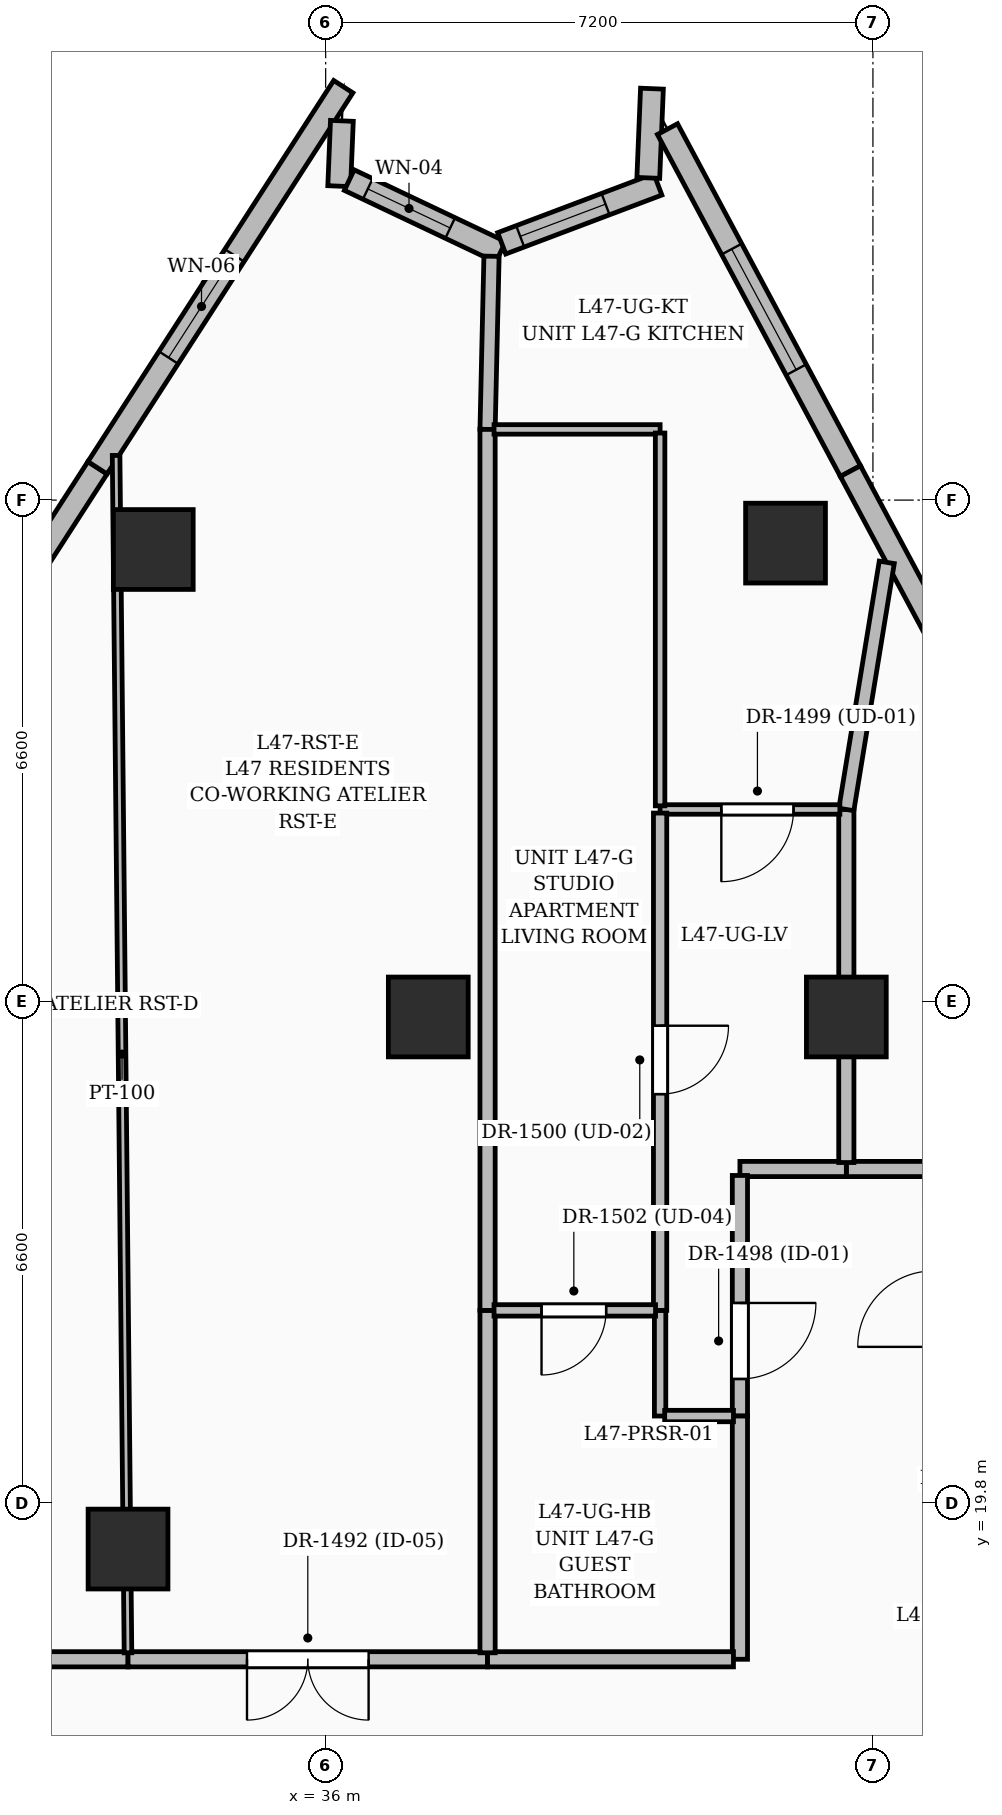
"""IFC4 building model, lengths in metres.
Left out: names, types, materials, properties, quantities, classifications, styles, units other than length and angle.
Written with IfcOpenShell. Run it as: python <this file> out.ifc"""

import sys

from ifc_helpers import new_model, si_unit, direction, frame, frame_2d, origin, origin_2d, place, context, subcontext, project, spatial, rectangle, extrude, element, fill, save


model = new_model("IFC4")
c1 = context("Model", 3, precision=1e-05, world=origin(), true_north=direction((0.0, 1.0)))
c2 = subcontext(c1, "Body", "Model", "MODEL_VIEW")
j1 = project(units=[si_unit("LENGTHUNIT", "METRE"), si_unit("PLANEANGLEUNIT", "RADIAN")], contexts=[c1])
p1 = place(None, origin())
s1 = spatial("IfcSite", under=j1, at=p1, CompositionType="ELEMENT")
p2 = place(p1, origin())
s2 = spatial("IfcBuilding", under=s1, at=p2, CompositionType="ELEMENT")
p3 = place(p2, frame((0.0, 0.0, 182.4)))
s3 = spatial("IfcBuildingStorey", under=s2, at=p3, CompositionType="ELEMENT", Elevation=182.4)
for number, where, z_axis, x_axis in (
    (1, (42.85, 26.2, 0.0), (0.0, 0.0, 1.0), (1.0, 0.0, 0.0)),
    (2, (37.35, 26.2, 0.0), (0.0, 0.0, 1.0), (1.0, 0.0, 0.0)),
    (3, (33.4, 19.2, 0.0), (0.0, 0.0, 1.0), (1.0, 0.0, 0.0)),
    (4, (42.05, 32.434, 0.0), (0.0, 0.0, 1.0), (1.0, 0.0, 0.0)),
    (5, (33.732, 32.35, 0.0), (0.0, 0.0, 1.0), (1.0, 0.0, 0.0)),
):
    element("IfcColumn", number, at=place(p3, frame(where, z_axis=z_axis, x_axis=x_axis)), inside=s3, PredefinedType="COLUMN", context=c2, shape_type="SweptSolid", body=[
        extrude(rectangle(XDim=1.05, YDim=1.05, at=origin_2d()), origin(), (0.0, 0.0, 1.0), 3.6),
    ])
p4 = place(p3, frame((29.764, 28.411, 0.0), z_axis=(0.0, 0.0, 1.0), x_axis=(0.542030871579, 0.840358574809, 0.0)))
e6 = element("IfcWall", 6, at=p4, inside=s3, PredefinedType="SOLIDWALL", context=c2, shape_type="SweptSolid", body=[
    extrude(rectangle(XDim=5.967, YDim=0.3, at=frame_2d((2.983, 0.0))), origin(), (0.0, 0.0, 1.0), 3.35),
])
p5 = place(p4, frame((2.0, 0.0, 0.6)))
e7 = element("IfcOpeningElement", 7, at=p5, cuts=e6, PredefinedType="OPENING", context=c2, shape_type="SweptSolid", body=[
    extrude(rectangle(XDim=1.8, YDim=2.1, at=frame_2d((0.9, 1.05))), frame((0.0, 0.16, 0.0), z_axis=(0.0, -1.0, 0.0), x_axis=(1.0, 0.0, 0.0)), (0.0, 0.0, 1.0), 0.32),
])
p6 = place(p3, frame((32.998, 33.425, 0.0), z_axis=(0.0, 0.0, 1.0), x_axis=(0.542020612911, 0.840365191556, 0.0)))
e8 = element("IfcWall", 8, at=p6, inside=s3, PredefinedType="SOLIDWALL", context=c2, shape_type="SweptSolid", body=[
    extrude(rectangle(XDim=5.966, YDim=0.3, at=frame_2d((2.983, 0.0))), origin(), (0.0, 0.0, 1.0), 3.35),
])
p7 = place(p6, frame((1.725, 0.0, 0.55)))
e9 = element("IfcOpeningElement", 9, at=p7, cuts=e8, PredefinedType="OPENING", context=c2, shape_type="SweptSolid", body=[
    extrude(rectangle(XDim=1.6, YDim=2.2, at=frame_2d((0.8, 1.1))), frame((0.0, 0.16, 0.0), z_axis=(0.0, -1.0, 0.0), x_axis=(1.0, 0.0, 0.0)), (0.0, 0.0, 1.0), 0.32),
])
p8 = place(p3, frame((36.213, 37.99, 0.0), z_axis=(0.0, 0.0, 1.0), x_axis=(-0.040874902035, -0.999164271971, 0.0)))
e10 = element("IfcWall", 10, at=p8, inside=s3, PredefinedType="SOLIDWALL", context=c2, shape_type="SweptSolid", body=[
    extrude(rectangle(XDim=0.86, YDim=0.3, at=frame_2d((0.43, 0.0))), origin(), (0.0, 0.0, 1.0), 3.35),
])
p9 = place(p3, frame((36.311, 37.21, 0.0), z_axis=(0.0, 0.0, 1.0), x_axis=(0.903471604204, -0.428647944585, 0.0)))
e11 = element("IfcWall", 11, at=p9, inside=s3, PredefinedType="SOLIDWALL", context=c2, shape_type="SweptSolid", body=[
    extrude(rectangle(XDim=2.205, YDim=0.3, at=frame_2d((1.103, 0.0))), origin(), (0.0, 0.0, 1.0), 3.35),
])
p10 = place(p9, frame((0.27, 0.0, 0.8)))
e12 = element("IfcOpeningElement", 12, at=p10, cuts=e11, PredefinedType="OPENING", context=c2, shape_type="SweptSolid", body=[
    extrude(rectangle(XDim=1.2, YDim=1.8, at=frame_2d((0.6, 0.9))), frame((0.0, 0.16, 0.0), z_axis=(0.0, -1.0, 0.0), x_axis=(1.0, 0.0, 0.0)), (0.0, 0.0, 1.0), 0.32),
])
p11 = place(p3, frame((38.316, 36.378, 0.0), z_axis=(0.0, 0.0, 1.0), x_axis=(0.935503953589, 0.353316222129, 0.0)))
e13 = element("IfcWall", 13, at=p11, inside=s3, PredefinedType="SOLIDWALL", context=c2, shape_type="SweptSolid", body=[
    extrude(rectangle(XDim=2.195, YDim=0.3, at=frame_2d((1.098, 0.0))), origin(), (0.0, 0.0, 1.0), 3.35),
])
p12 = place(p11, frame((0.26, 0.0, 0.8)))
e14 = element("IfcOpeningElement", 14, at=p12, cuts=e13, PredefinedType="OPENING", context=c2, shape_type="SweptSolid", body=[
    extrude(rectangle(XDim=1.2, YDim=1.8, at=frame_2d((0.6, 0.9))), frame((0.0, 0.16, 0.0), z_axis=(0.0, -1.0, 0.0), x_axis=(1.0, 0.0, 0.0)), (0.0, 0.0, 1.0), 0.32),
])
p13 = place(p3, frame((40.245, 37.239, 0.0), z_axis=(0.0, 0.0, 1.0), x_axis=(0.040939027533, 0.999161646594, 0.0)))
e15 = element("IfcWall", 15, at=p13, inside=s3, PredefinedType="SOLIDWALL", context=c2, shape_type="SweptSolid", body=[
    extrude(rectangle(XDim=1.175, YDim=0.3, at=frame_2d((0.587, 0.0))), origin(), (0.0, 0.0, 1.0), 3.35),
])
p14 = place(p3, frame((40.497, 37.881, 0.0), z_axis=(0.0, 0.0, 1.0), x_axis=(0.47173271257, -0.881741599274, 0.0)))
e16 = element("IfcWall", 16, at=p14, inside=s3, PredefinedType="SOLIDWALL", context=c2, shape_type="SweptSolid", body=[
    extrude(rectangle(XDim=5.103, YDim=0.3, at=frame_2d((2.551, 0.0))), origin(), (0.0, 0.0, 1.0), 3.35),
])
p15 = place(p14, frame((1.79, 0.0, 0.6)))
e17 = element("IfcOpeningElement", 17, at=p15, cuts=e16, PredefinedType="OPENING", context=c2, shape_type="SweptSolid", body=[
    extrude(rectangle(XDim=1.8, YDim=2.1, at=frame_2d((0.9, 1.05))), frame((0.0, 0.16, 0.0), z_axis=(0.0, -1.0, 0.0), x_axis=(1.0, 0.0, 0.0)), (0.0, 0.0, 1.0), 0.32),
])
p16 = place(p3, frame((42.904, 33.382, 0.0), z_axis=(0.0, 0.0, 1.0), x_axis=(0.4716995968, -0.881759315448, 0.0)))
e18 = element("IfcWall", 18, at=p16, inside=s3, PredefinedType="SOLIDWALL", context=c2, shape_type="SweptSolid", body=[
    extrude(rectangle(XDim=5.688, YDim=0.3, at=frame_2d((2.844, 0.0))), origin(), (0.0, 0.0, 1.0), 3.35),
])
p17 = place(p16, frame((2.35, 0.0, 0.55)))
e19 = element("IfcOpeningElement", 19, at=p17, cuts=e18, PredefinedType="OPENING", context=c2, shape_type="SweptSolid", body=[
    extrude(rectangle(XDim=1.6, YDim=2.2, at=frame_2d((0.8, 1.1))), frame((0.0, 0.16, 0.0), z_axis=(0.0, -1.0, 0.0), x_axis=(1.0, 0.0, 0.0)), (0.0, 0.0, 1.0), 0.32),
])
p18 = place(p3, frame((33.4, 17.75, 0.0), z_axis=(0.0, 0.0, 1.0), x_axis=(-1.0, 0.0, 0.0)))
e20 = element("IfcWall", 20, at=p18, inside=s3, PredefinedType="PARTITIONING", context=c2, shape_type="SweptSolid", body=[
    extrude(rectangle(XDim=1.45, YDim=0.2, at=frame_2d((0.725, 0.0))), origin(), (0.0, 0.0, 1.0), 3.35),
])
p19 = place(p3, frame((38.13, 17.75, 0.0), z_axis=(0.0, 0.0, 1.0), x_axis=(-1.0, 0.0, 0.0)))
e21 = element("IfcWall", 21, at=p19, inside=s3, PredefinedType="PARTITIONING", context=c2, shape_type="SweptSolid", body=[
    extrude(rectangle(XDim=4.73, YDim=0.2, at=frame_2d((2.365, 0.0))), origin(), (0.0, 0.0, 1.0), 2.436),
])
p20 = place(p19, frame((1.565, 0.0, 0.0)))
e22 = element("IfcOpeningElement", 22, at=p20, cuts=e21, PredefinedType="OPENING", context=c2, shape_type="SweptSolid", body=[
    extrude(rectangle(XDim=1.6, YDim=2.3, at=frame_2d((0.8, 1.15))), frame((0.0, 0.11, 0.0), z_axis=(0.0, -1.0, 0.0), x_axis=(1.0, 0.0, 0.0)), (0.0, 0.0, 1.0), 0.22),
])
p21 = place(p3, frame((43.915, 24.2, 0.0), z_axis=(0.0, 0.0, 1.0), x_axis=(-1.0, 0.0, 0.0)))
e23 = element("IfcWall", 23, at=p21, inside=s3, PredefinedType="PARTITIONING", context=c2, shape_type="SweptSolid", body=[
    extrude(rectangle(XDim=1.065, YDim=0.2, at=frame_2d((0.532, 0.0))), origin(), (0.0, 0.0, 1.0), 2.436),
])
p22 = place(p3, frame((42.85, 24.2, 0.0), z_axis=(0.0, 0.0, 1.0), x_axis=(-1.0, 0.0, 0.0)))
e24 = element("IfcWall", 24, at=p22, inside=s3, PredefinedType="PARTITIONING", context=c2, shape_type="SweptSolid", body=[
    extrude(rectangle(XDim=1.4, YDim=0.2, at=frame_2d((0.7, 0.0))), origin(), (0.0, 0.0, 1.0), 3.35),
])
p23 = place(p3, frame((41.45, 24.115, 0.0), z_axis=(0.0, 0.0, 1.0), x_axis=(0.0, -1.0, 0.0)))
e25 = element("IfcWall", 25, at=p23, inside=s3, PredefinedType="PARTITIONING", context=c2, shape_type="SweptSolid", body=[
    extrude(rectangle(XDim=3.165, YDim=0.2, at=frame_2d((1.583, 0.0))), origin(), (0.0, 0.0, 1.0), 3.35),
])
p24 = place(p23, frame((1.677, 0.0, 0.0)))
e26 = element("IfcOpeningElement", 26, at=p24, cuts=e25, PredefinedType="OPENING", context=c2, shape_type="SweptSolid", body=[
    extrude(rectangle(XDim=1.0, YDim=2.2, at=frame_2d((0.5, 1.1))), frame((0.0, 0.11, 0.0), z_axis=(0.0, -1.0, 0.0), x_axis=(1.0, 0.0, 0.0)), (0.0, 0.0, 1.0), 0.22),
])
p25 = place(p3, frame((41.45, 20.95, 0.0), z_axis=(0.0, 0.0, 1.0), x_axis=(0.0, -1.0, 0.0)))
e27 = element("IfcWall", 27, at=p25, inside=s3, PredefinedType="PARTITIONING", context=c2, shape_type="SweptSolid", body=[
    extrude(rectangle(XDim=3.2, YDim=0.2, at=frame_2d((1.6, 0.0))), origin(), (0.0, 0.0, 1.0), 3.35),
])
p26 = place(p3, frame((41.365, 17.75, 0.0), z_axis=(0.0, 0.0, 1.0), x_axis=(-1.0, 0.0, 0.0)))
e28 = element("IfcWall", 28, at=p26, inside=s3, PredefinedType="PARTITIONING", context=c2, shape_type="SweptSolid", body=[
    extrude(rectangle(XDim=3.235, YDim=0.2, at=frame_2d((1.618, 0.0))), origin(), (0.0, 0.0, 1.0), 3.35),
])
p27 = place(p3, frame((33.399, 17.835, 0.0), z_axis=(0.0, 0.0, 1.0), x_axis=(-0.009933797845, 0.999950658613, 0.0)))
e29 = element("IfcWall", 29, at=p27, inside=s3, PredefinedType="PARTITIONING", context=c2, shape_type="SweptSolid", body=[
    extrude(rectangle(XDim=15.754, YDim=0.1, at=frame_2d((7.877, 0.0))), origin(), (0.0, 0.0, 1.0), 2.436),
])
p28 = place(p3, frame((38.13, 17.835, 0.0), z_axis=(0.0, 0.0, 1.0), x_axis=(0.0, 1.0, 0.0)))
e30 = element("IfcWall", 30, at=p28, inside=s3, PredefinedType="PARTITIONING", context=c2, shape_type="SweptSolid", body=[
    extrude(rectangle(XDim=4.505, YDim=0.2, at=frame_2d((2.252, 0.0))), origin(), (0.0, 0.0, 1.0), 3.35),
])
p29 = place(p3, frame((38.13, 33.93, 0.0), z_axis=(0.0, 0.0, 1.0), x_axis=(0.022821190318, 0.999739562722, 0.0)))
e31 = element("IfcWall", 31, at=p29, inside=s3, PredefinedType="PARTITIONING", context=c2, shape_type="SweptSolid", body=[
    extrude(rectangle(XDim=2.279, YDim=0.2, at=frame_2d((1.139, 0.0))), origin(), (0.0, 0.0, 1.0), 3.35),
])
p30 = place(p3, frame((38.13, 22.34, 0.0), z_axis=(0.0, 0.0, 1.0), x_axis=(0.0, 1.0, 0.0)))
e32 = element("IfcWall", 32, at=p30, inside=s3, PredefinedType="PARTITIONING", context=c2, shape_type="SweptSolid", body=[
    extrude(rectangle(XDim=11.59, YDim=0.2, at=frame_2d((5.795, 0.0))), origin(), (0.0, 0.0, 1.0), 2.436),
])
p31 = place(p3, frame((42.85, 28.93, 0.0), z_axis=(0.0, 0.0, 1.0), x_axis=(0.0, -1.0, 0.0)))
e33 = element("IfcWall", 33, at=p31, inside=s3, PredefinedType="PARTITIONING", context=c2, shape_type="SweptSolid", body=[
    extrude(rectangle(XDim=4.645, YDim=0.2, at=frame_2d((2.323, 0.0))), origin(), (0.0, 0.0, 1.0), 2.436),
])
p32 = place(p3, frame((43.382, 32.181, 0.0), z_axis=(0.0, 0.0, 1.0), x_axis=(-0.161489880459, -0.986874368149, 0.0)))
e34 = element("IfcWall", 34, at=p32, inside=s3, PredefinedType="PARTITIONING", context=c2, shape_type="SweptSolid", body=[
    extrude(rectangle(XDim=3.294, YDim=0.2, at=frame_2d((1.647, 0.0))), origin(), (0.0, 0.0, 1.0), 2.57),
])
p33 = place(p3, frame((40.4, 22.34, 0.0), z_axis=(0.0, 0.0, 1.0), x_axis=(0.0, -1.0, 0.0)))
e35 = element("IfcWall", 35, at=p33, inside=s3, PredefinedType="PARTITIONING", context=c2, shape_type="SweptSolid", body=[
    extrude(rectangle(XDim=1.39, YDim=0.15, at=frame_2d((0.695, 0.0))), origin(), (0.0, 0.0, 1.0), 3.35),
])
p34 = place(p3, frame((40.46, 20.95, 0.0), z_axis=(0.0, 0.0, 1.0), x_axis=(1.0, 0.0, 0.0)))
e36 = element("IfcWall", 36, at=p34, inside=s3, PredefinedType="PARTITIONING", context=c2, shape_type="SweptSolid", body=[
    extrude(rectangle(XDim=0.905, YDim=0.15, at=frame_2d((0.453, 0.0))), origin(), (0.0, 0.0, 1.0), 3.35),
])
p35 = place(p3, frame((42.765, 28.93, 0.0), z_axis=(0.0, 0.0, 1.0), x_axis=(-1.0, 0.0, 0.0)))
e37 = element("IfcWall", 37, at=p35, inside=s3, PredefinedType="PARTITIONING", context=c2, shape_type="SweptSolid", body=[
    extrude(rectangle(XDim=2.365, YDim=0.125, at=frame_2d((1.183, 0.0))), origin(), (0.0, 0.0, 1.0), 2.464),
])
p36 = place(p35, frame((0.61, 0.0, 0.0)))
e38 = element("IfcOpeningElement", 38, at=p36, cuts=e37, PredefinedType="OPENING", context=c2, shape_type="SweptSolid", body=[
    extrude(rectangle(XDim=0.95, YDim=2.2, at=frame_2d((0.475, 1.1))), frame((0.0, 0.072, 0.0), z_axis=(0.0, -1.0, 0.0), x_axis=(1.0, 0.0, 0.0)), (0.0, 0.0, 1.0), 0.145),
])
p37 = place(p3, frame((40.4, 28.883, 0.0), z_axis=(0.0, 0.0, 1.0), x_axis=(0.0, -1.0, 0.0)))
e39 = element("IfcWall", 39, at=p37, inside=s3, PredefinedType="PARTITIONING", context=c2, shape_type="SweptSolid", body=[
    extrude(rectangle(XDim=6.542, YDim=0.175, at=frame_2d((3.271, 0.0))), origin(), (0.0, 0.0, 1.0), 2.436),
])
p38 = place(p37, frame((2.798, 0.0, 0.0)))
e40 = element("IfcOpeningElement", 40, at=p38, cuts=e39, PredefinedType="OPENING", context=c2, shape_type="SweptSolid", body=[
    extrude(rectangle(XDim=0.9, YDim=2.15, at=frame_2d((0.45, 1.075))), frame((0.0, 0.097, 0.0), z_axis=(0.0, -1.0, 0.0), x_axis=(1.0, 0.0, 0.0)), (0.0, 0.0, 1.0), 0.195),
])
p39 = place(p3, frame((40.34, 22.34, 0.0), z_axis=(0.0, 0.0, 1.0), x_axis=(-1.0, 0.0, 0.0)))
e41 = element("IfcWall", 41, at=p39, inside=s3, PredefinedType="PARTITIONING", context=c2, shape_type="SweptSolid", body=[
    extrude(rectangle(XDim=2.125, YDim=0.15, at=frame_2d((1.062, 0.0))), origin(), (0.0, 0.0, 1.0), 3.35),
])
p40 = place(p39, frame((0.65, 0.0, 0.0)))
e42 = element("IfcOpeningElement", 42, at=p40, cuts=e41, PredefinedType="OPENING", context=c2, shape_type="SweptSolid", body=[
    extrude(rectangle(XDim=0.85, YDim=2.1, at=frame_2d((0.425, 1.05))), frame((0.0, 0.085, 0.0), z_axis=(0.0, -1.0, 0.0), x_axis=(1.0, 0.0, 0.0)), (0.0, 0.0, 1.0), 0.17),
])
p41 = place(p3, frame((38.215, 33.93, 0.0), z_axis=(0.0, 0.0, 1.0), x_axis=(1.0, 0.0, 0.0)))
e43 = element("IfcWall", 43, at=p41, inside=s3, PredefinedType="PARTITIONING", context=c2, shape_type="SweptSolid", body=[
    extrude(rectangle(XDim=2.185, YDim=0.125, at=frame_2d((1.092, 0.0))), origin(), (0.0, 0.0, 1.0), 3.35),
])
p42 = place(p3, frame((40.4, 33.883, 0.0), z_axis=(0.0, 0.0, 1.0), x_axis=(0.0, -1.0, 0.0)))
e44 = element("IfcWall", 44, at=p42, inside=s3, PredefinedType="PARTITIONING", context=c2, shape_type="SweptSolid", body=[
    extrude(rectangle(XDim=4.905, YDim=0.125, at=frame_2d((2.453, 0.0))), origin(), (0.0, 0.0, 1.0), 2.57),
])
p43 = place(p7, origin())
e45 = element("IfcWindow", 45, at=p43, inside=s3, PartitioningType="SINGLE_PANEL", PredefinedType="WINDOW", context=c2, shape_type="SweptSolid", body=[
    extrude(rectangle(XDim=1.6, YDim=2.2, at=frame_2d((0.8, 1.1))), frame((0.0, 0.03, 0.0), z_axis=(0.0, -1.0, 0.0), x_axis=(1.0, 0.0, 0.0)), (0.0, 0.0, 1.0), 0.06),
])
fill(e9, e45)
p44 = place(p10, origin())
e46 = element("IfcWindow", 46, at=p44, inside=s3, PartitioningType="SINGLE_PANEL", PredefinedType="WINDOW", context=c2, shape_type="SweptSolid", body=[
    extrude(rectangle(XDim=1.2, YDim=1.8, at=frame_2d((0.6, 0.9))), frame((0.0, 0.03, 0.0), z_axis=(0.0, -1.0, 0.0), x_axis=(1.0, 0.0, 0.0)), (0.0, 0.0, 1.0), 0.06),
])
fill(e12, e46)
p45 = place(p12, origin())
e47 = element("IfcWindow", 47, at=p45, inside=s3, PartitioningType="SINGLE_PANEL", PredefinedType="WINDOW", context=c2, shape_type="SweptSolid", body=[
    extrude(rectangle(XDim=1.2, YDim=1.8, at=frame_2d((0.6, 0.9))), frame((0.0, 0.03, 0.0), z_axis=(0.0, -1.0, 0.0), x_axis=(1.0, 0.0, 0.0)), (0.0, 0.0, 1.0), 0.06),
])
fill(e14, e47)
p46 = place(p15, origin())
e48 = element("IfcWindow", 48, at=p46, inside=s3, PartitioningType="SINGLE_PANEL", PredefinedType="WINDOW", context=c2, shape_type="SweptSolid", body=[
    extrude(rectangle(XDim=1.8, YDim=2.1, at=frame_2d((0.9, 1.05))), frame((0.0, 0.03, 0.0), z_axis=(0.0, -1.0, 0.0), x_axis=(1.0, 0.0, 0.0)), (0.0, 0.0, 1.0), 0.06),
])
fill(e17, e48)
p47 = place(p20, origin())
e49 = element("IfcDoor", 49, at=p47, inside=s3, OperationType="DOUBLE_DOOR_SINGLE_SWING", PredefinedType="DOOR", context=c2, shape_type="SweptSolid", body=[
    extrude(rectangle(XDim=1.6, YDim=2.3, at=frame_2d((0.8, 1.15))), frame((0.0, 0.025, 0.0), z_axis=(0.0, -1.0, 0.0), x_axis=(1.0, 0.0, 0.0)), (0.0, 0.0, 1.0), 0.05),
])
fill(e22, e49)
p48 = place(p24, origin())
e50 = element("IfcDoor", 50, at=p48, inside=s3, OperationType="SINGLE_SWING_LEFT", PredefinedType="DOOR", context=c2, shape_type="SweptSolid", body=[
    extrude(rectangle(XDim=1.0, YDim=2.2, at=frame_2d((0.5, 1.1))), frame((0.0, 0.025, 0.0), z_axis=(0.0, -1.0, 0.0), x_axis=(1.0, 0.0, 0.0)), (0.0, 0.0, 1.0), 0.05),
])
fill(e26, e50)
p49 = place(p36, origin())
e51 = element("IfcDoor", 51, at=p49, inside=s3, OperationType="SINGLE_SWING_RIGHT", PredefinedType="DOOR", context=c2, shape_type="SweptSolid", body=[
    extrude(rectangle(XDim=0.95, YDim=2.2, at=frame_2d((0.475, 1.1))), frame((0.0, 0.025, 0.0), z_axis=(0.0, -1.0, 0.0), x_axis=(1.0, 0.0, 0.0)), (0.0, 0.0, 1.0), 0.05),
])
fill(e38, e51)
p50 = place(p38, origin())
e52 = element("IfcDoor", 52, at=p50, inside=s3, OperationType="SINGLE_SWING_LEFT", PredefinedType="DOOR", context=c2, shape_type="SweptSolid", body=[
    extrude(rectangle(XDim=0.9, YDim=2.15, at=frame_2d((0.45, 1.075))), frame((0.0, 0.025, 0.0), z_axis=(0.0, -1.0, 0.0), x_axis=(1.0, 0.0, 0.0)), (0.0, 0.0, 1.0), 0.05),
])
fill(e40, e52)
p51 = place(p40, origin())
e53 = element("IfcDoor", 53, at=p51, inside=s3, OperationType="SINGLE_SWING_RIGHT", PredefinedType="DOOR", context=c2, shape_type="SweptSolid", body=[
    extrude(rectangle(XDim=0.85, YDim=2.1, at=frame_2d((0.425, 1.05))), frame((0.0, 0.025, 0.0), z_axis=(0.0, -1.0, 0.0), x_axis=(1.0, 0.0, 0.0)), (0.0, 0.0, 1.0), 0.05),
])
fill(e42, e53)
save(model, sys.argv[1])
